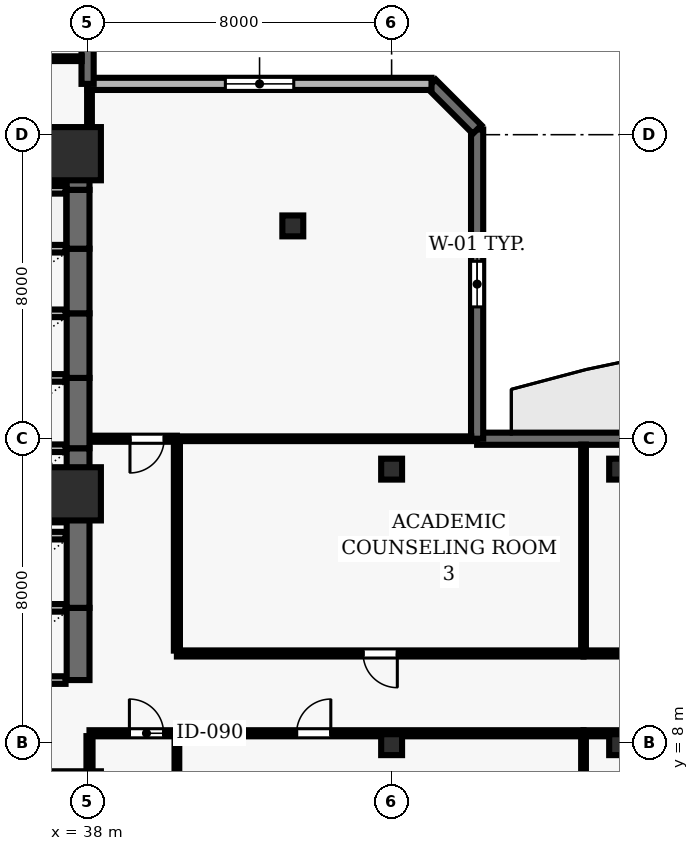
"""IFC4 building model, lengths in metres.
Left out: names, types, materials, properties, quantities, classifications, styles, units other than length and angle.
Written with IfcOpenShell. Run it as: python <this file> out.ifc"""

import sys

from ifc_helpers import new_model, si_unit, direction, frame, frame_2d, origin, origin_2d, place, context, subcontext, project, spatial, rectangle, hollow_rectangle, extrude, element, fill, save


model = new_model("IFC4")
c1 = context("Model", 3, precision=1e-05, world=origin(), true_north=direction((0.0, 1.0)))
c2 = subcontext(c1, "Body", "Model", "MODEL_VIEW")
j1 = project(units=[si_unit("LENGTHUNIT", "METRE"), si_unit("PLANEANGLEUNIT", "RADIAN")], contexts=[c1])
p1 = place(None, origin())
s1 = spatial("IfcSite", under=j1, at=p1, CompositionType="ELEMENT")
p2 = place(p1, origin())
s2 = spatial("IfcBuilding", under=s1, at=p2, CompositionType="ELEMENT")
p3 = place(p2, frame((0.0, 0.0, 81.7)))
s3 = spatial("IfcBuildingStorey", under=s2, at=p3, CompositionType="ELEMENT", Elevation=81.7)
for number, where, z_axis, x_axis in (
    (1, (37.65, 14.55, 0.0), (0.0, 0.0, 1.0), (1.0, 0.0, 0.0)),
    (2, (37.65, 23.5, 0.0), (0.0, 0.0, 1.0), (1.0, 0.0, 0.0)),
):
    element("IfcColumn", number, at=place(p3, frame(where, z_axis=z_axis, x_axis=x_axis)), inside=s3, PredefinedType="COLUMN", context=c2, shape_type="SweptSolid", body=[
        extrude(rectangle(XDim=1.4, YDim=1.4, at=origin_2d()), origin(), (0.0, 0.0, 1.0), 3.9),
    ])
for number, where, z_axis, x_axis in (
    (3, (46.0, 7.95, 0.0), (0.0, 0.0, 1.0), (1.0, 0.0, 0.0)),
    (4, (46.0, 15.2, 0.0), (0.0, 0.0, 1.0), (1.0, 0.0, 0.0)),
    (5, (52.0, 7.95, 0.0), (0.0, 0.0, 1.0), (1.0, 0.0, 0.0)),
    (6, (52.0, 15.2, 0.0), (0.0, 0.0, 1.0), (1.0, 0.0, 0.0)),
    (7, (43.4, 21.6, 0.0), (0.0, 0.0, 1.0), (1.0, 0.0, 0.0)),
):
    element("IfcColumn", number, at=place(p3, frame(where, z_axis=z_axis, x_axis=x_axis)), inside=s3, PredefinedType="COLUMN", context=c2, shape_type="SweptSolid", body=[
        extrude(hollow_rectangle(XDim=0.55, YDim=0.55, WallThickness=0.025, at=origin_2d()), origin(), (0.0, 0.0, 1.0), 3.9),
    ])
p4 = place(p3, frame((73.5, 16.0, 0.0), z_axis=(0.0, 0.0, 1.0), x_axis=(-1.0, 0.0, 0.0)))
e8 = element("IfcWall", 8, at=p4, inside=s3, PredefinedType="SOLIDWALL", context=c2, shape_type="SweptSolid", body=[
    extrude(rectangle(XDim=25.25, YDim=0.32, at=frame_2d((12.625, 0.0))), origin(), (0.0, 0.0, 1.0), 3.69),
])
p5 = place(p4, frame((12.025, 0.0, 0.0)))
e9 = element("IfcOpeningElement", 9, at=p5, cuts=e8, PredefinedType="OPENING", context=c2, shape_type="SweptSolid", body=[
    extrude(rectangle(XDim=1.0, YDim=2.2, at=frame_2d((0.5, 1.1))), frame((0.0, 0.17, 0.0), z_axis=(0.0, -1.0, 0.0), x_axis=(1.0, 0.0, 0.0)), (0.0, 0.0, 1.0), 0.34),
])
p6 = place(p4, frame((1.206, 0.0, 0.9)))
e10 = element("IfcOpeningElement", 10, at=p6, cuts=e8, PredefinedType="OPENING", context=c2, shape_type="SweptSolid", body=[
    extrude(rectangle(XDim=3.0, YDim=2.2, at=frame_2d((1.5, 1.1))), frame((0.0, 0.17, 0.0), z_axis=(0.0, -1.0, 0.0), x_axis=(1.0, 0.0, 0.0)), (0.0, 0.0, 1.0), 0.34),
])
p7 = place(p3, frame((48.25, 16.0, 0.0), z_axis=(0.0, 0.0, 1.0), x_axis=(0.0, 1.0, 0.0)))
e11 = element("IfcWall", 11, at=p7, inside=s3, PredefinedType="SOLIDWALL", context=c2, shape_type="SweptSolid", body=[
    extrude(rectangle(XDim=8.137, YDim=0.32, at=frame_2d((4.068, 0.0))), origin(), (0.0, 0.0, 1.0), 3.69),
])
p8 = place(p7, frame((3.469, 0.0, 0.9)))
e12 = element("IfcOpeningElement", 12, at=p8, cuts=e11, PredefinedType="OPENING", context=c2, shape_type="SweptSolid", body=[
    extrude(rectangle(XDim=1.2, YDim=1.6, at=frame_2d((0.6, 0.8))), frame((0.0, 0.17, 0.0), z_axis=(0.0, -1.0, 0.0), x_axis=(1.0, 0.0, 0.0)), (0.0, 0.0, 1.0), 0.34),
])
p9 = place(p3, frame((48.25, 24.137, 0.0), z_axis=(0.0, 0.0, 1.0), x_axis=(-0.707106781187, 0.707106781187, 0.0)))
e13 = element("IfcWall", 13, at=p9, inside=s3, PredefinedType="SOLIDWALL", context=c2, shape_type="SweptSolid", body=[
    extrude(rectangle(XDim=1.697, YDim=0.32, at=frame_2d((0.849, 0.0))), origin(), (0.0, 0.0, 1.0), 3.69),
])
p10 = place(p3, frame((47.05, 25.337, 0.0), z_axis=(0.0, 0.0, 1.0), x_axis=(-1.0, 0.0, 0.0)))
e14 = element("IfcWall", 14, at=p10, inside=s3, PredefinedType="SOLIDWALL", context=c2, shape_type="SweptSolid", body=[
    extrude(rectangle(XDim=9.05, YDim=0.32, at=frame_2d((4.525, 0.0))), origin(), (0.0, 0.0, 1.0), 3.69),
])
p11 = place(p10, frame((3.625, 0.0, 0.9)))
e15 = element("IfcOpeningElement", 15, at=p11, cuts=e14, PredefinedType="OPENING", context=c2, shape_type="SweptSolid", body=[
    extrude(rectangle(XDim=1.8, YDim=1.6, at=frame_2d((0.9, 0.8))), frame((0.0, 0.17, 0.0), z_axis=(0.0, -1.0, 0.0), x_axis=(1.0, 0.0, 0.0)), (0.0, 0.0, 1.0), 0.34),
])
p12 = place(p3, frame((38.0, 25.337, 0.0), z_axis=(0.0, 0.0, 1.0), x_axis=(0.0, 1.0, 0.0)))
e16 = element("IfcWall", 16, at=p12, inside=s3, PredefinedType="SOLIDWALL", context=c2, shape_type="SweptSolid", body=[
    extrude(rectangle(XDim=26.163, YDim=0.32, at=frame_2d((13.082, 0.0))), origin(), (0.0, 0.0, 1.0), 3.69),
])
p13 = place(p12, frame((12.681, 0.0, 0.0)))
e17 = element("IfcOpeningElement", 17, at=p13, cuts=e16, PredefinedType="OPENING", context=c2, shape_type="SweptSolid", body=[
    extrude(rectangle(XDim=1.0, YDim=2.2, at=frame_2d((0.5, 1.1))), frame((0.0, 0.17, 0.0), z_axis=(0.0, -1.0, 0.0), x_axis=(1.0, 0.0, 0.0)), (0.0, 0.0, 1.0), 0.34),
])
p14 = place(p12, frame((1.77, 0.0, 0.9)))
e18 = element("IfcOpeningElement", 18, at=p14, cuts=e16, PredefinedType="OPENING", context=c2, shape_type="SweptSolid", body=[
    extrude(rectangle(XDim=2.1, YDim=1.6, at=frame_2d((1.05, 0.8))), frame((0.0, 0.17, 0.0), z_axis=(0.0, -1.0, 0.0), x_axis=(1.0, 0.0, 0.0)), (0.0, 0.0, 1.0), 0.34),
])
p15 = place(p12, frame((21.843, 0.0, 0.9)))
e19 = element("IfcOpeningElement", 19, at=p15, cuts=e16, PredefinedType="OPENING", context=c2, shape_type="SweptSolid", body=[
    extrude(rectangle(XDim=2.1, YDim=1.6, at=frame_2d((1.05, 0.8))), frame((0.0, 0.17, 0.0), z_axis=(0.0, -1.0, 0.0), x_axis=(1.0, 0.0, 0.0)), (0.0, 0.0, 1.0), 0.34),
])
p16 = place(p3, frame((37.75, 9.65, 0.0), z_axis=(0.0, 0.0, 1.0), x_axis=(0.0, 1.0, 0.0)))
e20 = element("IfcWall", 20, at=p16, inside=s3, PredefinedType="SHEAR", context=c2, shape_type="SweptSolid", body=[
    extrude(rectangle(XDim=1.9, YDim=0.6, at=frame_2d((0.95, 0.0))), origin(), (0.0, 0.0, 1.0), 3.69),
])
for number, where, z_axis, x_axis in (
    (21, (35.28, 9.65, 0.0), (0.0, 0.0, 1.0), (1.0, 0.0, 0.0)),
    (22, (37.42, 11.55, 0.0), (0.0, 0.0, 1.0), (-1.0, 0.0, 0.0)),
):
    element("IfcWall", number, at=place(p3, frame(where, z_axis=z_axis, x_axis=x_axis)), inside=s3, PredefinedType="SOLIDWALL", context=c2, shape_type="SweptSolid", body=[
        extrude(rectangle(XDim=2.14, YDim=0.2, at=frame_2d((1.07, 0.0))), origin(), (0.0, 0.0, 1.0), 3.69),
    ])
p17 = place(p3, frame((37.75, 11.55, 0.0), z_axis=(0.0, 0.0, 1.0), x_axis=(0.0, 1.0, 0.0)))
e23 = element("IfcWall", 23, at=p17, inside=s3, PredefinedType="SHEAR", context=c2, shape_type="SweptSolid", body=[
    extrude(rectangle(XDim=2.35, YDim=0.6, at=frame_2d((1.175, 0.0))), origin(), (0.0, 0.0, 1.0), 3.69),
])
p18 = place(p3, frame((37.42, 13.45, 0.0), z_axis=(0.0, 0.0, 1.0), x_axis=(-1.0, 0.0, 0.0)))
e24 = element("IfcWall", 24, at=p18, inside=s3, PredefinedType="SOLIDWALL", context=c2, shape_type="SweptSolid", body=[
    extrude(rectangle(XDim=2.14, YDim=0.2, at=frame_2d((1.07, 0.0))), origin(), (0.0, 0.0, 1.0), 3.69),
])
p19 = place(p3, frame((37.75, 13.9, 0.0), z_axis=(0.0, 0.0, 1.0), x_axis=(0.0, 1.0, 0.0)))
e25 = element("IfcWall", 25, at=p19, inside=s3, PredefinedType="SHEAR", context=c2, shape_type="SweptSolid", body=[
    extrude(rectangle(XDim=1.85, YDim=0.6, at=frame_2d((0.925, 0.0))), origin(), (0.0, 0.0, 1.0), 3.69),
])
for number, where, z_axis, x_axis in (
    (26, (35.28, 13.9, 0.0), (0.0, 0.0, 1.0), (1.0, 0.0, 0.0)),
    (27, (37.42, 15.75, 0.0), (0.0, 0.0, 1.0), (-1.0, 0.0, 0.0)),
):
    element("IfcWall", number, at=place(p3, frame(where, z_axis=z_axis, x_axis=x_axis)), inside=s3, PredefinedType="SOLIDWALL", context=c2, shape_type="SweptSolid", body=[
        extrude(rectangle(XDim=2.14, YDim=0.2, at=frame_2d((1.07, 0.0))), origin(), (0.0, 0.0, 1.0), 3.69),
    ])
p20 = place(p3, frame((37.75, 15.75, 0.0), z_axis=(0.0, 0.0, 1.0), x_axis=(0.0, 1.0, 0.0)))
e28 = element("IfcWall", 28, at=p20, inside=s3, PredefinedType="SHEAR", context=c2, shape_type="SweptSolid", body=[
    extrude(rectangle(XDim=1.85, YDim=0.6, at=frame_2d((0.925, 0.0))), origin(), (0.0, 0.0, 1.0), 3.69),
])
p21 = place(p3, frame((37.42, 17.6, 0.0), z_axis=(0.0, 0.0, 1.0), x_axis=(-1.0, 0.0, 0.0)))
e29 = element("IfcWall", 29, at=p21, inside=s3, PredefinedType="SOLIDWALL", context=c2, shape_type="SweptSolid", body=[
    extrude(rectangle(XDim=2.14, YDim=0.2, at=frame_2d((1.07, 0.0))), origin(), (0.0, 0.0, 1.0), 3.69),
])
p22 = place(p3, frame((37.75, 17.6, 0.0), z_axis=(0.0, 0.0, 1.0), x_axis=(0.0, 1.0, 0.0)))
e30 = element("IfcWall", 30, at=p22, inside=s3, PredefinedType="SHEAR", context=c2, shape_type="SweptSolid", body=[
    extrude(rectangle(XDim=1.7, YDim=0.6, at=frame_2d((0.85, 0.0))), origin(), (0.0, 0.0, 1.0), 3.69),
])
p23 = place(p3, frame((37.42, 19.3, 0.0), z_axis=(0.0, 0.0, 1.0), x_axis=(-1.0, 0.0, 0.0)))
e31 = element("IfcWall", 31, at=p23, inside=s3, PredefinedType="SOLIDWALL", context=c2, shape_type="SweptSolid", body=[
    extrude(rectangle(XDim=2.14, YDim=0.2, at=frame_2d((1.07, 0.0))), origin(), (0.0, 0.0, 1.0), 3.69),
])
p24 = place(p3, frame((37.75, 19.3, 0.0), z_axis=(0.0, 0.0, 1.0), x_axis=(0.0, 1.0, 0.0)))
e32 = element("IfcWall", 32, at=p24, inside=s3, PredefinedType="SHEAR", context=c2, shape_type="SweptSolid", body=[
    extrude(rectangle(XDim=1.7, YDim=0.6, at=frame_2d((0.85, 0.0))), origin(), (0.0, 0.0, 1.0), 3.69),
])
p25 = place(p3, frame((37.42, 21.0, 0.0), z_axis=(0.0, 0.0, 1.0), x_axis=(-1.0, 0.0, 0.0)))
e33 = element("IfcWall", 33, at=p25, inside=s3, PredefinedType="SOLIDWALL", context=c2, shape_type="SweptSolid", body=[
    extrude(rectangle(XDim=2.14, YDim=0.2, at=frame_2d((1.07, 0.0))), origin(), (0.0, 0.0, 1.0), 3.69),
])
p26 = place(p3, frame((37.75, 21.0, 0.0), z_axis=(0.0, 0.0, 1.0), x_axis=(0.0, 1.0, 0.0)))
e34 = element("IfcWall", 34, at=p26, inside=s3, PredefinedType="SHEAR", context=c2, shape_type="SweptSolid", body=[
    extrude(rectangle(XDim=1.55, YDim=0.6, at=frame_2d((0.775, 0.0))), origin(), (0.0, 0.0, 1.0), 3.69),
])
p27 = place(p3, frame((37.42, 22.55, 0.0), z_axis=(0.0, 0.0, 1.0), x_axis=(-1.0, 0.0, 0.0)))
e35 = element("IfcWall", 35, at=p27, inside=s3, PredefinedType="SOLIDWALL", context=c2, shape_type="SweptSolid", body=[
    extrude(rectangle(XDim=2.14, YDim=0.2, at=frame_2d((1.07, 0.0))), origin(), (0.0, 0.0, 1.0), 3.69),
])
p28 = place(p3, frame((37.75, 22.55, 0.0), z_axis=(0.0, 0.0, 1.0), x_axis=(0.0, 1.0, 0.0)))
e36 = element("IfcWall", 36, at=p28, inside=s3, PredefinedType="SHEAR", context=c2, shape_type="SweptSolid", body=[
    extrude(rectangle(XDim=1.5, YDim=0.6, at=frame_2d((0.75, 0.0))), origin(), (0.0, 0.0, 1.0), 3.69),
])
p29 = place(p3, frame((37.42, 24.05, 0.0), z_axis=(0.0, 0.0, 1.0), x_axis=(-1.0, 0.0, 0.0)))
e37 = element("IfcWall", 37, at=p29, inside=s3, PredefinedType="SOLIDWALL", context=c2, shape_type="SweptSolid", body=[
    extrude(rectangle(XDim=2.14, YDim=0.2, at=frame_2d((1.07, 0.0))), origin(), (0.0, 0.0, 1.0), 3.69),
])
p30 = place(p3, frame((35.15, 26.0, 0.0), z_axis=(0.0, 0.0, 1.0), x_axis=(1.0, 0.0, 0.0)))
e38 = element("IfcWall", 38, at=p30, inside=s3, PredefinedType="PARTITIONING", context=c2, shape_type="SweptSolid", body=[
    extrude(rectangle(XDim=2.695, YDim=0.125, at=frame_2d((1.348, 0.0))), origin(), (0.0, 0.0, 1.0), 3.69),
])
p31 = place(p3, frame((38.05, 8.25, 0.0), z_axis=(0.0, 0.0, 1.0), x_axis=(1.0, 0.0, 0.0)))
e39 = element("IfcWall", 39, at=p31, inside=s3, PredefinedType="PARTITIONING", context=c2, shape_type="SweptSolid", body=[
    extrude(rectangle(XDim=2.3, YDim=0.16, at=frame_2d((1.15, 0.0))), origin(), (0.0, 0.0, 1.0), 3.055),
])
p32 = place(p31, frame((1.05, 0.0, 0.0)))
e40 = element("IfcOpeningElement", 40, at=p32, cuts=e39, PredefinedType="OPENING", context=c2, shape_type="SweptSolid", body=[
    extrude(rectangle(XDim=0.9, YDim=2.1, at=frame_2d((0.45, 1.05))), frame((0.0, 0.09, 0.0), z_axis=(0.0, -1.0, 0.0), x_axis=(1.0, 0.0, 0.0)), (0.0, 0.0, 1.0), 0.18),
])
p33 = place(p3, frame((40.35, 8.25, 0.0), z_axis=(0.0, 0.0, 1.0), x_axis=(1.0, 0.0, 0.0)))
e41 = element("IfcWall", 41, at=p33, inside=s3, PredefinedType="PARTITIONING", context=c2, shape_type="SweptSolid", body=[
    extrude(rectangle(XDim=10.7, YDim=0.16, at=frame_2d((5.35, 0.0))), origin(), (0.0, 0.0, 1.0), 3.055),
])
p34 = place(p33, frame((3.15, 0.0, 0.0)))
e42 = element("IfcOpeningElement", 42, at=p34, cuts=e41, PredefinedType="OPENING", context=c2, shape_type="SweptSolid", body=[
    extrude(rectangle(XDim=0.9, YDim=2.1, at=frame_2d((0.45, 1.05))), frame((0.0, 0.09, 0.0), z_axis=(0.0, -1.0, 0.0), x_axis=(1.0, 0.0, 0.0)), (0.0, 0.0, 1.0), 0.18),
])
p35 = place(p3, frame((40.35, 16.0, 0.0), z_axis=(0.0, 0.0, 1.0), x_axis=(1.0, 0.0, 0.0)))
e43 = element("IfcWall", 43, at=p35, inside=s3, PredefinedType="PARTITIONING", context=c2, shape_type="SweptSolid", body=[
    extrude(rectangle(XDim=7.745, YDim=0.125, at=frame_2d((3.873, 0.0))), origin(), (0.0, 0.0, 1.0), 3.39),
])
p36 = place(p3, frame((40.35, 16.0, 0.0), z_axis=(0.0, 0.0, 1.0), x_axis=(-1.0, 0.0, 0.0)))
e44 = element("IfcWall", 44, at=p36, inside=s3, PredefinedType="PARTITIONING", context=c2, shape_type="SweptSolid", body=[
    extrude(rectangle(XDim=2.27, YDim=0.16, at=frame_2d((1.135, 0.0))), origin(), (0.0, 0.0, 1.0), 3.69),
])
p37 = place(p36, frame((0.335, 0.0, 0.0)))
e45 = element("IfcOpeningElement", 45, at=p37, cuts=e44, PredefinedType="OPENING", context=c2, shape_type="SweptSolid", body=[
    extrude(rectangle(XDim=0.9, YDim=2.1, at=frame_2d((0.45, 1.05))), frame((0.0, 0.09, 0.0), z_axis=(0.0, -1.0, 0.0), x_axis=(1.0, 0.0, 0.0)), (0.0, 0.0, 1.0), 0.18),
])
p38 = place(p3, frame((51.05, 8.25, 0.0), z_axis=(0.0, 0.0, 1.0), x_axis=(1.0, 0.0, 0.0)))
e46 = element("IfcWall", 46, at=p38, inside=s3, PredefinedType="PARTITIONING", context=c2, shape_type="SweptSolid", body=[
    extrude(rectangle(XDim=12.15, YDim=0.16, at=frame_2d((6.075, 0.0))), origin(), (0.0, 0.0, 1.0), 3.055),
])
p39 = place(p38, frame((4.225, 0.0, 0.0)))
e47 = element("IfcOpeningElement", 47, at=p39, cuts=e46, PredefinedType="OPENING", context=c2, shape_type="SweptSolid", body=[
    extrude(rectangle(XDim=0.9, YDim=2.1, at=frame_2d((0.45, 1.05))), frame((0.0, 0.09, 0.0), z_axis=(0.0, -1.0, 0.0), x_axis=(1.0, 0.0, 0.0)), (0.0, 0.0, 1.0), 0.18),
])
p40 = place(p3, frame((51.05, 10.35, 0.0), z_axis=(0.0, 0.0, 1.0), x_axis=(-1.0, 0.0, 0.0)))
e48 = element("IfcWall", 48, at=p40, inside=s3, PredefinedType="PARTITIONING", context=c2, shape_type="SweptSolid", body=[
    extrude(rectangle(XDim=10.7, YDim=0.16, at=frame_2d((5.35, 0.0))), origin(), (0.0, 0.0, 1.0), 3.277),
])
p41 = place(p40, frame((4.9, 0.0, 0.0)))
e49 = element("IfcOpeningElement", 49, at=p41, cuts=e48, PredefinedType="OPENING", context=c2, shape_type="SweptSolid", body=[
    extrude(rectangle(XDim=0.9, YDim=2.1, at=frame_2d((0.45, 1.05))), frame((0.0, 0.09, 0.0), z_axis=(0.0, -1.0, 0.0), x_axis=(1.0, 0.0, 0.0)), (0.0, 0.0, 1.0), 0.18),
])
p42 = place(p3, frame((63.2, 10.35, 0.0), z_axis=(0.0, 0.0, 1.0), x_axis=(-1.0, 0.0, 0.0)))
e50 = element("IfcWall", 50, at=p42, inside=s3, PredefinedType="PARTITIONING", context=c2, shape_type="SweptSolid", body=[
    extrude(rectangle(XDim=12.15, YDim=0.16, at=frame_2d((6.075, 0.0))), origin(), (0.0, 0.0, 1.0), 3.277),
])
p43 = place(p42, frame((5.625, 0.0, 0.0)))
e51 = element("IfcOpeningElement", 51, at=p43, cuts=e50, PredefinedType="OPENING", context=c2, shape_type="SweptSolid", body=[
    extrude(rectangle(XDim=0.9, YDim=2.1, at=frame_2d((0.45, 1.05))), frame((0.0, 0.09, 0.0), z_axis=(0.0, -1.0, 0.0), x_axis=(1.0, 0.0, 0.0)), (0.0, 0.0, 1.0), 0.18),
])
p44 = place(p3, frame((38.05, 7.05, 0.0), z_axis=(0.0, 0.0, 1.0), x_axis=(0.0, 1.0, 0.0)))
e52 = element("IfcWall", 52, at=p44, inside=s3, PredefinedType="PARTITIONING", context=c2, shape_type="SweptSolid", body=[
    extrude(rectangle(XDim=1.125, YDim=0.16, at=frame_2d((0.562, 0.0))), origin(), (0.0, 0.0, 1.0), 3.055),
])
p45 = place(p3, frame((38.05, 25.182, 0.0), z_axis=(0.0, 0.0, 1.0), x_axis=(0.0, -1.0, 0.0)))
e53 = element("IfcWall", 53, at=p45, inside=s3, PredefinedType="PARTITIONING", context=c2, shape_type="SweptSolid", body=[
    extrude(rectangle(XDim=1.132, YDim=0.125, at=frame_2d((0.566, 0.0))), origin(), (0.0, 0.0, 1.0), 3.055),
])
p46 = place(p3, frame((40.35, 0.155, 0.0), z_axis=(0.0, 0.0, 1.0), x_axis=(0.0, 1.0, 0.0)))
e54 = element("IfcWall", 54, at=p46, inside=s3, PredefinedType="PARTITIONING", context=c2, shape_type="SweptSolid", body=[
    extrude(rectangle(XDim=8.02, YDim=0.125, at=frame_2d((4.01, 0.0))), origin(), (0.0, 0.0, 1.0), 3.69),
])
p47 = place(p3, frame((40.35, 10.425, 0.0), z_axis=(0.0, 0.0, 1.0), x_axis=(0.0, 1.0, 0.0)))
e55 = element("IfcWall", 55, at=p47, inside=s3, PredefinedType="PARTITIONING", context=c2, shape_type="SweptSolid", body=[
    extrude(rectangle(XDim=5.5, YDim=0.16, at=frame_2d((2.75, 0.0))), origin(), (0.0, 0.0, 1.0), 3.277),
])
p48 = place(p3, frame((51.05, 0.155, 0.0), z_axis=(0.0, 0.0, 1.0), x_axis=(0.0, 1.0, 0.0)))
e56 = element("IfcWall", 56, at=p48, inside=s3, PredefinedType="PARTITIONING", context=c2, shape_type="SweptSolid", body=[
    extrude(rectangle(XDim=8.02, YDim=0.125, at=frame_2d((4.01, 0.0))), origin(), (0.0, 0.0, 1.0), 3.69),
])
p49 = place(p3, frame((51.05, 10.425, 0.0), z_axis=(0.0, 0.0, 1.0), x_axis=(0.0, 1.0, 0.0)))
e57 = element("IfcWall", 57, at=p49, inside=s3, PredefinedType="PARTITIONING", context=c2, shape_type="SweptSolid", body=[
    extrude(rectangle(XDim=5.42, YDim=0.125, at=frame_2d((2.71, 0.0))), origin(), (0.0, 0.0, 1.0), 3.69),
])
p50 = place(p8, origin())
e58 = element("IfcWindow", 58, at=p50, inside=s3, PartitioningType="SINGLE_PANEL", PredefinedType="WINDOW", context=c2, shape_type="SweptSolid", body=[
    extrude(rectangle(XDim=1.2, YDim=1.6, at=frame_2d((0.6, 0.8))), frame((0.0, 0.03, 0.0), z_axis=(0.0, -1.0, 0.0), x_axis=(1.0, 0.0, 0.0)), (0.0, 0.0, 1.0), 0.06),
])
fill(e12, e58)
p51 = place(p11, origin())
e59 = element("IfcWindow", 59, at=p51, inside=s3, PartitioningType="SINGLE_PANEL", PredefinedType="WINDOW", context=c2, shape_type="SweptSolid", body=[
    extrude(rectangle(XDim=1.8, YDim=1.6, at=frame_2d((0.9, 0.8))), frame((0.0, 0.03, 0.0), z_axis=(0.0, -1.0, 0.0), x_axis=(1.0, 0.0, 0.0)), (0.0, 0.0, 1.0), 0.06),
])
fill(e15, e59)
p52 = place(p32, origin())
e60 = element("IfcDoor", 60, at=p52, inside=s3, OperationType="SINGLE_SWING_LEFT", PredefinedType="DOOR", context=c2, shape_type="SweptSolid", body=[
    extrude(rectangle(XDim=0.9, YDim=2.1, at=frame_2d((0.45, 1.05))), frame((0.0, 0.025, 0.0), z_axis=(0.0, -1.0, 0.0), x_axis=(1.0, 0.0, 0.0)), (0.0, 0.0, 1.0), 0.05),
])
fill(e40, e60)
p53 = place(p34, origin())
e61 = element("IfcDoor", 61, at=p53, inside=s3, OperationType="SINGLE_SWING_RIGHT", PredefinedType="DOOR", context=c2, shape_type="SweptSolid", body=[
    extrude(rectangle(XDim=0.9, YDim=2.1, at=frame_2d((0.45, 1.05))), frame((0.0, 0.025, 0.0), z_axis=(0.0, -1.0, 0.0), x_axis=(1.0, 0.0, 0.0)), (0.0, 0.0, 1.0), 0.05),
])
fill(e42, e61)
p54 = place(p41, origin())
e62 = element("IfcDoor", 62, at=p54, inside=s3, OperationType="SINGLE_SWING_LEFT", PredefinedType="DOOR", context=c2, shape_type="SweptSolid", body=[
    extrude(rectangle(XDim=0.9, YDim=2.1, at=frame_2d((0.45, 1.05))), frame((0.0, 0.025, 0.0), z_axis=(0.0, -1.0, 0.0), x_axis=(1.0, 0.0, 0.0)), (0.0, 0.0, 1.0), 0.05),
])
fill(e49, e62)
p55 = place(p37, origin())
e63 = element("IfcDoor", 63, at=p55, inside=s3, OperationType="SINGLE_SWING_RIGHT", PredefinedType="DOOR", context=c2, shape_type="SweptSolid", body=[
    extrude(rectangle(XDim=0.9, YDim=2.1, at=frame_2d((0.45, 1.05))), frame((0.0, 0.025, 0.0), z_axis=(0.0, -1.0, 0.0), x_axis=(1.0, 0.0, 0.0)), (0.0, 0.0, 1.0), 0.05),
])
fill(e45, e63)
save(model, sys.argv[1])
